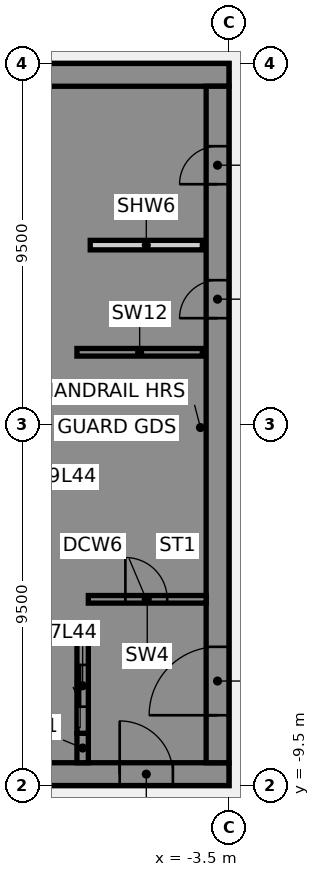
"""IFC4 building model, lengths in metres.
Left out: names, types, materials, properties, quantities, classifications, styles, units other than length and angle.
Written with IfcOpenShell. Run it as: python <this file> out.ifc"""

import sys

from ifc_helpers import new_model, si_unit, direction, frame, frame_2d, origin, place, context, subcontext, project, spatial, polyline, rectangle, outline, extrude, element, fill, save


model = new_model("IFC4")
c1 = context("Model", 3, precision=1e-05, world=origin(), true_north=direction((0.0, 1.0)))
c2 = subcontext(c1, "Body", "Model", "MODEL_VIEW")
j1 = project(units=[si_unit("LENGTHUNIT", "METRE"), si_unit("PLANEANGLEUNIT", "RADIAN")], contexts=[c1])
p1 = place(None, origin())
s1 = spatial("IfcSite", under=j1, at=p1, CompositionType="ELEMENT")
p2 = place(p1, origin())
s2 = spatial("IfcBuilding", under=s1, at=p2, CompositionType="ELEMENT")
p3 = place(p2, frame((0.0, 0.0, 178.0)))
s3 = spatial("IfcBuildingStorey", under=s2, at=p3, CompositionType="ELEMENT", Elevation=178.0)
p4 = place(p3, frame((-16.5, -9.2, 0.0), z_axis=(0.0, 0.0, 1.0), x_axis=(1.0, 0.0, 0.0)))
e1 = element("IfcWall", 1, at=p4, inside=s3, PredefinedType="SHEAR", context=c2, shape_type="SweptSolid", body=[
    extrude(rectangle(XDim=13.0, YDim=0.6, at=frame_2d((6.5, 0.0))), origin(), (0.0, 0.0, 1.0), 4.36),
])
p5 = place(p4, frame((4.15, 0.0, 0.0)))
e2 = element("IfcOpeningElement", 2, at=p5, cuts=e1, PredefinedType="OPENING", context=c2, shape_type="SweptSolid", body=[
    extrude(rectangle(XDim=1.4, YDim=2.1, at=frame_2d((0.7, 1.05))), frame((0.0, 0.31, 0.0), z_axis=(0.0, -1.0, 0.0), x_axis=(1.0, 0.0, 0.0)), (0.0, 0.0, 1.0), 0.62),
])
p6 = place(p4, frame((10.125, 0.0, 0.0)))
e3 = element("IfcOpeningElement", 3, at=p6, cuts=e1, PredefinedType="OPENING", context=c2, shape_type="SweptSolid", body=[
    extrude(rectangle(XDim=1.4, YDim=2.1, at=frame_2d((0.7, 1.05))), frame((0.0, 0.31, 0.0), z_axis=(0.0, -1.0, 0.0), x_axis=(1.0, 0.0, 0.0)), (0.0, 0.0, 1.0), 0.62),
])
p7 = place(p3, frame((-16.5, 9.2, 0.0), z_axis=(0.0, 0.0, 1.0), x_axis=(1.0, 0.0, 0.0)))
e4 = element("IfcWall", 4, at=p7, inside=s3, PredefinedType="SHEAR", context=c2, shape_type="SweptSolid", body=[
    extrude(rectangle(XDim=13.0, YDim=0.6, at=frame_2d((6.5, 0.0))), origin(), (0.0, 0.0, 1.0), 4.36),
])
p8 = place(p7, frame((4.15, 0.0, 0.0)))
e5 = element("IfcOpeningElement", 5, at=p8, cuts=e4, PredefinedType="OPENING", context=c2, shape_type="SweptSolid", body=[
    extrude(rectangle(XDim=1.4, YDim=2.1, at=frame_2d((0.7, 1.05))), frame((0.0, 0.31, 0.0), z_axis=(0.0, -1.0, 0.0), x_axis=(1.0, 0.0, 0.0)), (0.0, 0.0, 1.0), 0.62),
])
p9 = place(p3, origin())
e6 = element("IfcWall", 6, at=p9, inside=s3, PredefinedType="SHEAR", context=c2, shape_type="SweptSolid", body=[
    extrude(outline(polyline([(-9.8, -5.375), (-9.8, -5.625), (-7.5, -5.625), (-7.2, -5.625), (-7.2, 8.9), (-7.5, 8.9), (-9.8, 8.9), (-9.8, 8.125), (-7.5, 8.125), (-7.5, 5.625), (-9.8, 5.625), (-9.8, 5.375), (-7.5, 5.375), (-7.5, 2.875), (-9.8, 2.875), (-9.8, 2.625), (-7.5, 2.625), (-7.5, 0.125), (-9.8, 0.125), (-9.8, -0.125), (-7.5, -0.125), (-7.5, -2.625), (-9.8, -2.625), (-9.8, -2.875), (-7.5, -2.875), (-7.5, -5.375), (-9.8, -5.375)])), origin(), (0.0, 0.0, 1.0), 4.36),
])
p10 = place(p3, origin())
e7 = element("IfcWall", 7, at=p10, inside=s3, PredefinedType="SHEAR", context=c2, shape_type="SweptSolid", body=[
    extrude(outline(polyline([(-7.5, -8.125), (-9.55, -8.125), (-9.55, -5.625), (-9.8, -5.625), (-9.8, -8.125), (-9.8, -8.9), (-7.5, -8.9), (-7.5, -8.125)])), origin(), (0.0, 0.0, 1.0), 4.36),
])
p11 = place(p3, frame((-7.35, -8.9, 0.0), z_axis=(0.0, 0.0, 1.0), x_axis=(0.0, 1.0, 0.0)))
e8 = element("IfcWall", 8, at=p11, inside=s3, PredefinedType="SHEAR", context=c2, shape_type="SweptSolid", body=[
    extrude(rectangle(XDim=0.775, YDim=0.3, at=frame_2d((0.387, 0.0))), origin(), (0.0, 0.0, 1.0), 4.36),
])
p12 = place(p3, frame((-7.5, 1.9, 0.0), z_axis=(0.0, 0.0, 1.0), x_axis=(1.0, 0.0, 0.0)))
e9 = element("IfcWall", 9, at=p12, inside=s3, PredefinedType="SHEAR", context=c2, shape_type="SweptSolid", body=[
    extrude(rectangle(XDim=3.3, YDim=0.2, at=frame_2d((1.65, 0.0))), origin(), (0.0, 0.0, 1.0), 4.36),
])
p13 = place(p3, frame((-7.35, -8.125, 0.0), z_axis=(0.0, 0.0, 1.0), x_axis=(0.0, 1.0, 0.0)))
e10 = element("IfcWall", 10, at=p13, inside=s3, PredefinedType="SHEAR", context=c2, shape_type="SweptSolid", body=[
    extrude(rectangle(XDim=2.5, YDim=0.3, at=frame_2d((1.25, 0.0))), origin(), (0.0, 0.0, 1.0), 4.36),
])
p14 = place(p13, frame((0.7, 0.0, 0.0)))
e11 = element("IfcOpeningElement", 11, at=p14, cuts=e10, PredefinedType="OPENING", context=c2, shape_type="SweptSolid", body=[
    extrude(rectangle(XDim=1.1, YDim=2.1, at=frame_2d((0.55, 1.05))), frame((0.0, 0.16, 0.0), z_axis=(0.0, -1.0, 0.0), x_axis=(1.0, 0.0, 0.0)), (0.0, 0.0, 1.0), 0.32),
])
p15 = place(p3, frame((-3.8, -8.9, 0.0), z_axis=(0.0, 0.0, 1.0), x_axis=(0.0, 1.0, 0.0)))
e12 = element("IfcWall", 12, at=p15, inside=s3, PredefinedType="SHEAR", context=c2, shape_type="SweptSolid", body=[
    extrude(rectangle(XDim=17.8, YDim=0.6, at=frame_2d((8.9, 0.0))), origin(), (0.0, 0.0, 1.0), 4.36),
])
p16 = place(p15, frame((1.25, 0.0, 0.0)))
e13 = element("IfcOpeningElement", 13, at=p16, cuts=e12, PredefinedType="OPENING", context=c2, shape_type="SweptSolid", body=[
    extrude(rectangle(XDim=1.8, YDim=2.1, at=frame_2d((0.9, 1.05))), frame((0.0, 0.31, 0.0), z_axis=(0.0, -1.0, 0.0), x_axis=(1.0, 0.0, 0.0)), (0.0, 0.0, 1.0), 0.62),
])
p17 = place(p15, frame((11.698, 0.0, 0.0)))
e14 = element("IfcOpeningElement", 14, at=p17, cuts=e12, PredefinedType="OPENING", context=c2, shape_type="SweptSolid", body=[
    extrude(rectangle(XDim=1.0, YDim=2.1, at=frame_2d((0.5, 1.05))), frame((0.0, 0.31, 0.0), z_axis=(0.0, -1.0, 0.0), x_axis=(1.0, 0.0, 0.0)), (0.0, 0.0, 1.0), 0.62),
])
p18 = place(p15, frame((15.222, 0.0, 0.0)))
e15 = element("IfcOpeningElement", 15, at=p18, cuts=e12, PredefinedType="OPENING", context=c2, shape_type="SweptSolid", body=[
    extrude(rectangle(XDim=1.0, YDim=2.1, at=frame_2d((0.5, 1.05))), frame((0.0, 0.31, 0.0), z_axis=(0.0, -1.0, 0.0), x_axis=(1.0, 0.0, 0.0)), (0.0, 0.0, 1.0), 0.62),
])
p19 = place(p3, frame((-7.15, 4.72, 0.0), z_axis=(0.0, 0.0, 1.0), x_axis=(1.0, 0.0, 0.0)))
e16 = element("IfcWall", 16, at=p19, inside=s3, PredefinedType="PARTITIONING", context=c2, shape_type="SweptSolid", body=[
    extrude(rectangle(XDim=2.95, YDim=0.25, at=frame_2d((1.475, 0.0))), origin(), (0.0, 0.0, 1.0), 4.36),
])
p20 = place(p3, frame((-7.2, -4.6, 0.0), z_axis=(0.0, 0.0, 1.0), x_axis=(1.0, 0.0, 0.0)))
e17 = element("IfcWall", 17, at=p20, inside=s3, PredefinedType="SHEAR", context=c2, shape_type="SweptSolid", body=[
    extrude(rectangle(XDim=3.1, YDim=0.2, at=frame_2d((1.55, 0.0))), origin(), (0.0, 0.0, 1.0), 4.36),
])
p21 = place(p20, frame((0.975, 0.0, 0.0)))
e18 = element("IfcOpeningElement", 18, at=p21, cuts=e17, PredefinedType="OPENING", context=c2, shape_type="SweptSolid", body=[
    extrude(rectangle(XDim=1.1, YDim=2.1, at=frame_2d((0.55, 1.05))), frame((0.0, 0.11, 0.0), z_axis=(0.0, -1.0, 0.0), x_axis=(1.0, 0.0, 0.0)), (0.0, 0.0, 1.0), 0.22),
])
p22 = place(p6, origin())
e19 = element("IfcDoor", 19, at=p22, inside=s3, OperationType="SINGLE_SWING_LEFT", PredefinedType="DOOR", context=c2, shape_type="SweptSolid", body=[
    extrude(rectangle(XDim=1.4, YDim=2.1, at=frame_2d((0.7, 1.05))), frame((0.0, 0.025, 0.0), z_axis=(0.0, -1.0, 0.0), x_axis=(1.0, 0.0, 0.0)), (0.0, 0.0, 1.0), 0.05),
])
fill(e3, e19)
p23 = place(p16, origin())
e20 = element("IfcDoor", 20, at=p23, inside=s3, OperationType="SINGLE_SWING_LEFT", PredefinedType="DOOR", context=c2, shape_type="SweptSolid", body=[
    extrude(rectangle(XDim=1.8, YDim=2.1, at=frame_2d((0.9, 1.05))), frame((0.0, 0.025, 0.0), z_axis=(0.0, -1.0, 0.0), x_axis=(1.0, 0.0, 0.0)), (0.0, 0.0, 1.0), 0.05),
])
fill(e13, e20)
p24 = place(p17, origin())
e21 = element("IfcDoor", 21, at=p24, inside=s3, OperationType="SINGLE_SWING_LEFT", PredefinedType="DOOR", context=c2, shape_type="SweptSolid", body=[
    extrude(rectangle(XDim=1.0, YDim=2.1, at=frame_2d((0.5, 1.05))), frame((0.0, 0.275, 0.0), z_axis=(0.0, -1.0, 0.0), x_axis=(1.0, 0.0, 0.0)), (0.0, 0.0, 1.0), 0.05),
])
fill(e14, e21)
p25 = place(p18, origin())
e22 = element("IfcDoor", 22, at=p25, inside=s3, OperationType="SINGLE_SWING_LEFT", PredefinedType="DOOR", context=c2, shape_type="SweptSolid", body=[
    extrude(rectangle(XDim=1.0, YDim=2.1, at=frame_2d((0.5, 1.05))), frame((0.0, 0.275, 0.0), z_axis=(0.0, -1.0, 0.0), x_axis=(1.0, 0.0, 0.0)), (0.0, 0.0, 1.0), 0.05),
])
fill(e15, e22)
p26 = place(p21, origin())
e23 = element("IfcDoor", 23, at=p26, inside=s3, OperationType="SINGLE_SWING_LEFT", PredefinedType="DOOR", context=c2, shape_type="SweptSolid", body=[
    extrude(rectangle(XDim=1.1, YDim=2.1, at=frame_2d((0.55, 1.05))), frame((0.0, 0.025, 0.0), z_axis=(0.0, -1.0, 0.0), x_axis=(1.0, 0.0, 0.0)), (0.0, 0.0, 1.0), 0.05),
])
fill(e18, e23)
p27 = place(p14, origin())
e24 = element("IfcDoor", 24, at=p27, inside=s3, OperationType="SLIDING_TO_LEFT", PredefinedType="DOOR", context=c2, shape_type="SweptSolid", body=[
    extrude(rectangle(XDim=1.1, YDim=2.1, at=frame_2d((0.55, 1.05))), frame((0.0, 0.025, 0.0), z_axis=(0.0, -1.0, 0.0), x_axis=(1.0, 0.0, 0.0)), (0.0, 0.0, 1.0), 0.05),
])
fill(e11, e24)
save(model, sys.argv[1])
